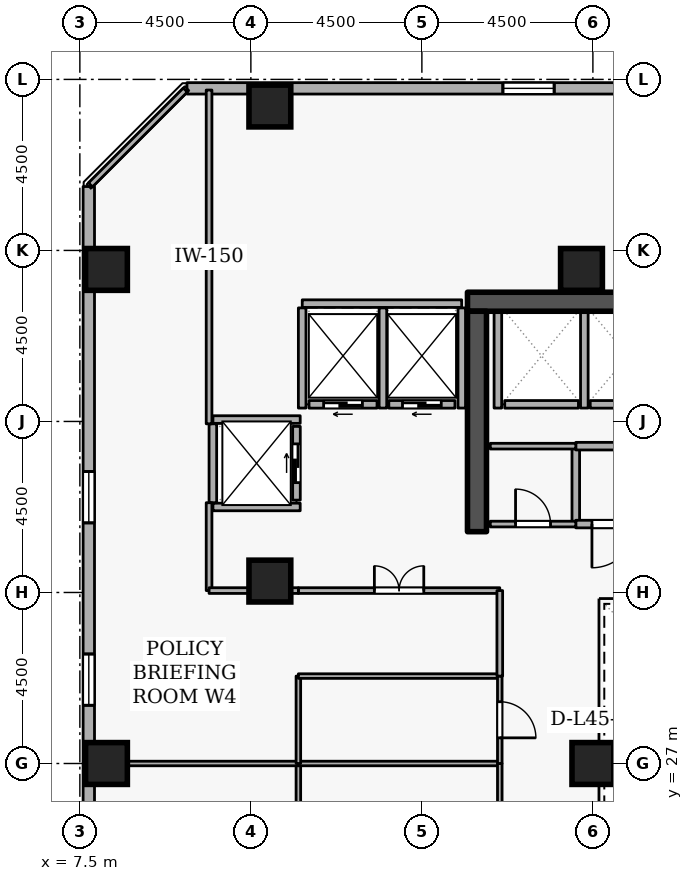
"""IFC4 building model, lengths in metres.
Left out: names, types, materials, properties, quantities, classifications, styles, units other than length and angle.
Written with IfcOpenShell. Run it as: python <this file> out.ifc"""

import sys

from ifc_helpers import new_model, si_unit, direction, frame, frame_2d, origin, origin_2d, place, context, subcontext, project, spatial, rectangle, extrude, element, fill, save


model = new_model("IFC4")
c1 = context("Model", 3, precision=1e-05, world=origin(), true_north=direction((0.0, 1.0)))
c2 = subcontext(c1, "Body", "Model", "MODEL_VIEW")
j1 = project(units=[si_unit("LENGTHUNIT", "METRE"), si_unit("PLANEANGLEUNIT", "RADIAN")], contexts=[c1])
p1 = place(None, origin())
s1 = spatial("IfcSite", under=j1, at=p1, CompositionType="ELEMENT")
p2 = place(p1, origin())
s2 = spatial("IfcBuilding", under=s1, at=p2, CompositionType="ELEMENT")
p3 = place(p2, frame((0.0, 0.0, 170.7)))
s3 = spatial("IfcBuildingStorey", under=s2, at=p3, CompositionType="ELEMENT", Elevation=170.7)
p4 = place(p3, frame((17.7, 39.15, 0.0), z_axis=(0.0, 0.0, 1.0), x_axis=(1.0, 0.0, 0.0)))
e1 = element("IfcWall", 1, at=p4, inside=s3, PredefinedType="SHEAR", context=c2, shape_type="SweptSolid", body=[
    extrude(rectangle(XDim=15.6, YDim=0.5, at=frame_2d((7.8, 0.0))), origin(), (0.0, 0.0, 1.0), 3.6),
])
p5 = place(p3, frame((17.95, 33.1, 0.0), z_axis=(0.0, 0.0, 1.0), x_axis=(0.0, 1.0, 0.0)))
e2 = element("IfcWall", 2, at=p5, inside=s3, PredefinedType="SHEAR", context=c2, shape_type="SweptSolid", body=[
    extrude(rectangle(XDim=5.8, YDim=0.5, at=frame_2d((2.9, 0.0))), origin(), (0.0, 0.0, 1.0), 3.6),
])
for number, where, z_axis, x_axis in (
    (3, (12.5, 44.3, 0.0), (0.0, 0.0, 1.0), (1.0, 0.0, 0.0)),
    (4, (8.2, 27.0, 0.0), (0.0, 0.0, 1.0), (1.0, 0.0, 0.0)),
    (5, (8.2, 40.0, 0.0), (0.0, 0.0, 1.0), (1.0, 0.0, 0.0)),
    (6, (12.5, 31.8, 0.0), (0.0, 0.0, 1.0), (1.0, 0.0, 0.0)),
    (7, (20.7, 40.0, 0.0), (0.0, 0.0, 1.0), (1.0, 0.0, 0.0)),
    (8, (21.0, 27.0, 0.0), (0.0, 0.0, 1.0), (1.0, 0.0, 0.0)),
):
    element("IfcColumn", number, at=place(p3, frame(where, z_axis=z_axis, x_axis=x_axis)), inside=s3, PredefinedType="COLUMN", context=c2, shape_type="SweptSolid", body=[
        extrude(rectangle(XDim=1.1, YDim=1.1, at=origin_2d()), origin(), (0.0, 0.0, 1.0), 3.6),
    ])
p6 = place(p3, frame((46.681, 44.765, 0.0), z_axis=(0.0, 0.0, 1.0), x_axis=(-1.0, 0.0, 0.0)))
e9 = element("IfcWall", 9, at=p6, inside=s3, PredefinedType="STANDARD", context=c2, shape_type="SweptSolid", body=[
    extrude(rectangle(XDim=36.363, YDim=0.3, at=frame_2d((18.181, 0.0))), origin(), (0.0, 0.0, 1.0), 2.22),
])
p7 = place(p6, frame((2.7, 0.0, 0.72)))
e10 = element("IfcOpeningElement", 10, at=p7, cuts=e9, PredefinedType="OPENING", context=c2, shape_type="SweptSolid", body=[
    extrude(rectangle(XDim=1.35, YDim=1.05, at=frame_2d((0.675, 0.525))), frame((0.0, 0.16, 0.0), z_axis=(0.0, -1.0, 0.0), x_axis=(1.0, 0.0, 0.0)), (0.0, 0.0, 1.0), 0.32),
])
p8 = place(p6, frame((12.3, 0.0, 0.72)))
e11 = element("IfcOpeningElement", 11, at=p8, cuts=e9, PredefinedType="OPENING", context=c2, shape_type="SweptSolid", body=[
    extrude(rectangle(XDim=1.35, YDim=1.05, at=frame_2d((0.675, 0.525))), frame((0.0, 0.16, 0.0), z_axis=(0.0, -1.0, 0.0), x_axis=(1.0, 0.0, 0.0)), (0.0, 0.0, 1.0), 0.32),
])
p9 = place(p6, frame((17.1, 0.0, 0.72)))
e12 = element("IfcOpeningElement", 12, at=p9, cuts=e9, PredefinedType="OPENING", context=c2, shape_type="SweptSolid", body=[
    extrude(rectangle(XDim=1.35, YDim=1.05, at=frame_2d((0.675, 0.525))), frame((0.0, 0.16, 0.0), z_axis=(0.0, -1.0, 0.0), x_axis=(1.0, 0.0, 0.0)), (0.0, 0.0, 1.0), 0.32),
])
p10 = place(p6, frame((26.7, 0.0, 0.72)))
e13 = element("IfcOpeningElement", 13, at=p10, cuts=e9, PredefinedType="OPENING", context=c2, shape_type="SweptSolid", body=[
    extrude(rectangle(XDim=1.35, YDim=1.05, at=frame_2d((0.675, 0.525))), frame((0.0, 0.16, 0.0), z_axis=(0.0, -1.0, 0.0), x_axis=(1.0, 0.0, 0.0)), (0.0, 0.0, 1.0), 0.32),
])
p11 = place(p3, frame((7.735, 42.181, 0.0), z_axis=(0.0, 0.0, 1.0), x_axis=(0.0, -1.0, 0.0)))
e14 = element("IfcWall", 14, at=p11, inside=s3, PredefinedType="STANDARD", context=c2, shape_type="SweptSolid", body=[
    extrude(rectangle(XDim=36.363, YDim=0.3, at=frame_2d((18.181, 0.0))), origin(), (0.0, 0.0, 1.0), 2.22),
])
p12 = place(p11, frame((7.5, 0.0, 0.72)))
e15 = element("IfcOpeningElement", 15, at=p12, cuts=e14, PredefinedType="OPENING", context=c2, shape_type="SweptSolid", body=[
    extrude(rectangle(XDim=1.35, YDim=1.05, at=frame_2d((0.675, 0.525))), frame((0.0, 0.16, 0.0), z_axis=(0.0, -1.0, 0.0), x_axis=(1.0, 0.0, 0.0)), (0.0, 0.0, 1.0), 0.32),
])
p13 = place(p11, frame((12.3, 0.0, 0.72)))
e16 = element("IfcOpeningElement", 16, at=p13, cuts=e14, PredefinedType="OPENING", context=c2, shape_type="SweptSolid", body=[
    extrude(rectangle(XDim=1.35, YDim=1.05, at=frame_2d((0.675, 0.525))), frame((0.0, 0.16, 0.0), z_axis=(0.0, -1.0, 0.0), x_axis=(1.0, 0.0, 0.0)), (0.0, 0.0, 1.0), 0.32),
])
p14 = place(p11, frame((17.1, 0.0, 0.72)))
e17 = element("IfcOpeningElement", 17, at=p14, cuts=e14, PredefinedType="OPENING", context=c2, shape_type="SweptSolid", body=[
    extrude(rectangle(XDim=1.35, YDim=1.05, at=frame_2d((0.675, 0.525))), frame((0.0, 0.16, 0.0), z_axis=(0.0, -1.0, 0.0), x_axis=(1.0, 0.0, 0.0)), (0.0, 0.0, 1.0), 0.32),
])
p15 = place(p11, frame((21.9, 0.0, 0.72)))
e18 = element("IfcOpeningElement", 18, at=p15, cuts=e14, PredefinedType="OPENING", context=c2, shape_type="SweptSolid", body=[
    extrude(rectangle(XDim=1.35, YDim=1.05, at=frame_2d((0.675, 0.525))), frame((0.0, 0.16, 0.0), z_axis=(0.0, -1.0, 0.0), x_axis=(1.0, 0.0, 0.0)), (0.0, 0.0, 1.0), 0.32),
])
p16 = place(p11, frame((31.5, 0.0, 0.72)))
e19 = element("IfcOpeningElement", 19, at=p16, cuts=e14, PredefinedType="OPENING", context=c2, shape_type="SweptSolid", body=[
    extrude(rectangle(XDim=1.35, YDim=1.05, at=frame_2d((0.675, 0.525))), frame((0.0, 0.16, 0.0), z_axis=(0.0, -1.0, 0.0), x_axis=(1.0, 0.0, 0.0)), (0.0, 0.0, 1.0), 0.32),
])
p17 = place(p3, frame((22.92, 36.45, 0.0), z_axis=(0.0, 0.0, 1.0), x_axis=(-1.0, 0.0, 0.0)))
e20 = element("IfcWall", 20, at=p17, inside=s3, PredefinedType="STANDARD", context=c2, shape_type="SweptSolid", body=[
    extrude(rectangle(XDim=1.99, YDim=0.2, at=frame_2d((0.995, 0.0))), origin(), (0.0, 0.0, 1.0), 3.26),
])
p18 = place(p3, frame((20.62, 36.45, 0.0), z_axis=(0.0, 0.0, 1.0), x_axis=(-1.0, 0.0, 0.0)))
e21 = element("IfcWall", 21, at=p18, inside=s3, PredefinedType="STANDARD", context=c2, shape_type="SweptSolid", body=[
    extrude(rectangle(XDim=1.94, YDim=0.2, at=frame_2d((0.97, 0.0))), origin(), (0.0, 0.0, 1.0), 3.26),
])
p19 = place(p3, frame((17.37, 36.45, 0.0), z_axis=(0.0, 0.0, 1.0), x_axis=(-1.0, 0.0, 0.0)))
e22 = element("IfcWall", 22, at=p19, inside=s3, PredefinedType="STANDARD", context=c2, shape_type="SweptSolid", body=[
    extrude(rectangle(XDim=1.74, YDim=0.2, at=frame_2d((0.87, 0.0))), origin(), (0.0, 0.0, 1.0), 3.26),
])
p20 = place(p19, frame((0.36, 0.0, 0.0)))
e23 = element("IfcOpeningElement", 23, at=p20, cuts=e22, PredefinedType="OPENING", context=c2, shape_type="SweptSolid", body=[
    extrude(rectangle(XDim=1.02, YDim=2.06, at=frame_2d((0.51, 1.03))), frame((0.0, 0.11, 0.0), z_axis=(0.0, -1.0, 0.0), x_axis=(1.0, 0.0, 0.0)), (0.0, 0.0, 1.0), 0.22),
])
p21 = place(p3, frame((15.32, 36.45, 0.0), z_axis=(0.0, 0.0, 1.0), x_axis=(-1.0, 0.0, 0.0)))
e24 = element("IfcWall", 24, at=p21, inside=s3, PredefinedType="STANDARD", context=c2, shape_type="SweptSolid", body=[
    extrude(rectangle(XDim=1.79, YDim=0.2, at=frame_2d((0.895, 0.0))), origin(), (0.0, 0.0, 1.0), 3.26),
])
p22 = place(p21, frame((0.385, 0.0, 0.0)))
e25 = element("IfcOpeningElement", 25, at=p22, cuts=e24, PredefinedType="OPENING", context=c2, shape_type="SweptSolid", body=[
    extrude(rectangle(XDim=1.02, YDim=2.06, at=frame_2d((0.51, 1.03))), frame((0.0, 0.11, 0.0), z_axis=(0.0, -1.0, 0.0), x_axis=(1.0, 0.0, 0.0)), (0.0, 0.0, 1.0), 0.22),
])
p23 = place(p3, frame((13.2, 33.93, 0.0), z_axis=(0.0, 0.0, 1.0), x_axis=(0.0, 1.0, 0.0)))
e26 = element("IfcWall", 26, at=p23, inside=s3, PredefinedType="STANDARD", context=c2, shape_type="SweptSolid", body=[
    extrude(rectangle(XDim=1.94, YDim=0.2, at=frame_2d((0.97, 0.0))), origin(), (0.0, 0.0, 1.0), 3.26),
])
p24 = place(p23, frame((0.46, 0.0, 0.0)))
e27 = element("IfcOpeningElement", 27, at=p24, cuts=e26, PredefinedType="OPENING", context=c2, shape_type="SweptSolid", body=[
    extrude(rectangle(XDim=1.02, YDim=2.06, at=frame_2d((0.51, 1.03))), frame((0.0, 0.11, 0.0), z_axis=(0.0, -1.0, 0.0), x_axis=(1.0, 0.0, 0.0)), (0.0, 0.0, 1.0), 0.22),
])
for number, where, z_axis, x_axis in (
    (28, (20.775, 36.352, 0.0), (0.0, 0.0, 1.0), (0.0, 1.0, 0.0)),
    (29, (18.5, 36.352, 0.0), (0.0, 0.0, 1.0), (0.0, 1.0, 0.0)),
):
    element("IfcWall", number, at=place(p3, frame(where, z_axis=z_axis, x_axis=x_axis)), inside=s3, PredefinedType="STANDARD", context=c2, shape_type="SweptSolid", body=[
        extrude(rectangle(XDim=2.536, YDim=0.2, at=frame_2d((1.268, 0.0))), origin(), (0.0, 0.0, 1.0), 3.26),
    ])
p25 = place(p3, frame((13.352, 39.1, 0.0), z_axis=(0.0, 0.0, 1.0), x_axis=(1.0, 0.0, 0.0)))
e30 = element("IfcWall", 30, at=p25, inside=s3, PredefinedType="STANDARD", context=c2, shape_type="SweptSolid", body=[
    extrude(rectangle(XDim=4.196, YDim=0.2, at=frame_2d((2.098, 0.0))), origin(), (0.0, 0.0, 1.0), 3.26),
])
p26 = place(p3, frame((17.55, 36.352, 0.0), z_axis=(0.0, 0.0, 1.0), x_axis=(0.0, 1.0, 0.0)))
e31 = element("IfcWall", 31, at=p26, inside=s3, PredefinedType="STANDARD", context=c2, shape_type="SweptSolid", body=[
    extrude(rectangle(XDim=2.636, YDim=0.2, at=frame_2d((1.318, 0.0))), origin(), (0.0, 0.0, 1.0), 2.465),
])
for number, where, z_axis, x_axis in (
    (32, (15.475, 36.352, 0.0), (0.0, 0.0, 1.0), (0.0, 1.0, 0.0)),
    (33, (13.35, 36.352, 0.0), (0.0, 0.0, 1.0), (0.0, 1.0, 0.0)),
):
    element("IfcWall", number, at=place(p3, frame(where, z_axis=z_axis, x_axis=x_axis)), inside=s3, PredefinedType="STANDARD", context=c2, shape_type="SweptSolid", body=[
        extrude(rectangle(XDim=2.636, YDim=0.2, at=frame_2d((1.318, 0.0))), origin(), (0.0, 0.0, 1.0), 3.26),
    ])
for number, where, z_axis, x_axis in (
    (34, (11.002, 36.05, 0.0), (0.0, 0.0, 1.0), (1.0, 0.0, 0.0)),
    (35, (11.002, 33.75, 0.0), (0.0, 0.0, 1.0), (1.0, 0.0, 0.0)),
):
    element("IfcWall", number, at=place(p3, frame(where, z_axis=z_axis, x_axis=x_axis)), inside=s3, PredefinedType="STANDARD", context=c2, shape_type="SweptSolid", body=[
        extrude(rectangle(XDim=2.296, YDim=0.2, at=frame_2d((1.148, 0.0))), origin(), (0.0, 0.0, 1.0), 3.26),
    ])
p27 = place(p3, frame((11.0, 33.862, 0.0), z_axis=(0.0, 0.0, 1.0), x_axis=(0.0, 1.0, 0.0)))
e36 = element("IfcWall", 36, at=p27, inside=s3, PredefinedType="STANDARD", context=c2, shape_type="SweptSolid", body=[
    extrude(rectangle(XDim=2.076, YDim=0.2, at=frame_2d((1.038, 0.0))), origin(), (0.0, 0.0, 1.0), 3.26),
])
p28 = place(p3, frame((20.55, 33.3, 0.0), z_axis=(0.0, 0.0, 1.0), x_axis=(0.0, 1.0, 0.0)))
e37 = element("IfcWall", 37, at=p28, inside=s3, PredefinedType="STANDARD", context=c2, shape_type="SweptSolid", body=[
    extrude(rectangle(XDim=2.05, YDim=0.2, at=frame_2d((1.025, 0.0))), origin(), (0.0, 0.0, 1.0), 3.26),
])
p29 = place(p3, frame((20.55, 35.35, 0.0), z_axis=(0.0, 0.0, 1.0), x_axis=(1.0, 0.0, 0.0)))
e38 = element("IfcWall", 38, at=p29, inside=s3, PredefinedType="STANDARD", context=c2, shape_type="SweptSolid", body=[
    extrude(rectangle(XDim=2.0, YDim=0.2, at=frame_2d((1.0, 0.0))), origin(), (0.0, 0.0, 1.0), 3.26),
])
p30 = place(p3, frame((22.55, 33.3, 0.0), z_axis=(0.0, 0.0, 1.0), x_axis=(-1.0, 0.0, 0.0)))
e39 = element("IfcWall", 39, at=p30, inside=s3, PredefinedType="STANDARD", context=c2, shape_type="SweptSolid", body=[
    extrude(rectangle(XDim=2.0, YDim=0.2, at=frame_2d((1.0, 0.0))), origin(), (0.0, 0.0, 1.0), 3.26),
])
p31 = place(p30, frame((0.425, 0.0, 0.0)))
e40 = element("IfcOpeningElement", 40, at=p31, cuts=e39, PredefinedType="OPENING", context=c2, shape_type="SweptSolid", body=[
    extrude(rectangle(XDim=1.15, YDim=2.1, at=frame_2d((0.575, 1.05))), frame((0.0, 0.11, 0.0), z_axis=(0.0, -1.0, 0.0), x_axis=(1.0, 0.0, 0.0)), (0.0, 0.0, 1.0), 0.22),
])
p32 = place(p3, frame((18.3, 33.3, 0.0), z_axis=(0.0, 0.0, 1.0), x_axis=(1.0, 0.0, 0.0)))
e41 = element("IfcWall", 41, at=p32, inside=s3, PredefinedType="PARTITIONING", context=c2, shape_type="SweptSolid", body=[
    extrude(rectangle(XDim=2.25, YDim=0.15, at=frame_2d((1.125, 0.0))), origin(), (0.0, 0.0, 1.0), 3.26),
])
p33 = place(p32, frame((0.665, 0.0, 0.0)))
e42 = element("IfcOpeningElement", 42, at=p33, cuts=e41, PredefinedType="OPENING", context=c2, shape_type="SweptSolid", body=[
    extrude(rectangle(XDim=0.92, YDim=2.08, at=frame_2d((0.46, 1.04))), frame((0.0, 0.085, 0.0), z_axis=(0.0, -1.0, 0.0), x_axis=(1.0, 0.0, 0.0)), (0.0, 0.0, 1.0), 0.17),
])
p34 = place(p3, frame((20.55, 35.35, 0.0), z_axis=(0.0, 0.0, 1.0), x_axis=(-1.0, 0.0, 0.0)))
e43 = element("IfcWall", 43, at=p34, inside=s3, PredefinedType="PARTITIONING", context=c2, shape_type="SweptSolid", body=[
    extrude(rectangle(XDim=2.25, YDim=0.15, at=frame_2d((1.125, 0.0))), origin(), (0.0, 0.0, 1.0), 3.26),
])
p35 = place(p3, frame((13.25, 27.0, 0.0), z_axis=(0.0, 0.0, 1.0), x_axis=(0.0, -1.0, 0.0)))
e44 = element("IfcWall", 44, at=p35, inside=s3, PredefinedType="PARTITIONING", context=c2, shape_type="SweptSolid", body=[
    extrude(rectangle(XDim=4.55, YDim=0.12, at=frame_2d((2.275, 0.0))), origin(), (0.0, 0.0, 1.0), 3.26),
])
p36 = place(p3, frame((7.78, 27.0, 0.0), z_axis=(0.0, 0.0, 1.0), x_axis=(1.0, 0.0, 0.0)))
e45 = element("IfcWall", 45, at=p36, inside=s3, PredefinedType="PARTITIONING", context=c2, shape_type="SweptSolid", body=[
    extrude(rectangle(XDim=5.47, YDim=0.12, at=frame_2d((2.735, 0.0))), origin(), (0.0, 0.0, 1.0), 2.802),
])
p37 = place(p3, frame((13.25, 27.0, 0.0), z_axis=(0.0, 0.0, 1.0), x_axis=(1.0, 0.0, 0.0)))
e46 = element("IfcWall", 46, at=p37, inside=s3, PredefinedType="PARTITIONING", context=c2, shape_type="SweptSolid", body=[
    extrude(rectangle(XDim=5.3, YDim=0.12, at=frame_2d((2.65, 0.0))), origin(), (0.0, 0.0, 1.0), 2.802),
])
p38 = place(p3, frame((18.55, 27.0, 0.0), z_axis=(0.0, 0.0, 1.0), x_axis=(0.0, -1.0, 0.0)))
e47 = element("IfcWall", 47, at=p38, inside=s3, PredefinedType="PARTITIONING", context=c2, shape_type="SweptSolid", body=[
    extrude(rectangle(XDim=4.55, YDim=0.12, at=frame_2d((2.275, 0.0))), origin(), (0.0, 0.0, 1.0), 3.26),
])
p39 = place(p3, frame((13.25, 27.0, 0.0), z_axis=(0.0, 0.0, 1.0), x_axis=(0.0, 1.0, 0.0)))
e48 = element("IfcWall", 48, at=p39, inside=s3, PredefinedType="PARTITIONING", context=c2, shape_type="SweptSolid", body=[
    extrude(rectangle(XDim=2.3, YDim=0.12, at=frame_2d((1.15, 0.0))), origin(), (0.0, 0.0, 1.0), 3.26),
])
p40 = place(p3, frame((13.25, 29.3, 0.0), z_axis=(0.0, 0.0, 1.0), x_axis=(1.0, 0.0, 0.0)))
e49 = element("IfcWall", 49, at=p40, inside=s3, PredefinedType="PARTITIONING", context=c2, shape_type="SweptSolid", body=[
    extrude(rectangle(XDim=5.3, YDim=0.12, at=frame_2d((2.65, 0.0))), origin(), (0.0, 0.0, 1.0), 3.26),
])
p41 = place(p3, frame((18.55, 29.3, 0.0), z_axis=(0.0, 0.0, 1.0), x_axis=(0.0, -1.0, 0.0)))
e50 = element("IfcWall", 50, at=p41, inside=s3, PredefinedType="PARTITIONING", context=c2, shape_type="SweptSolid", body=[
    extrude(rectangle(XDim=2.3, YDim=0.12, at=frame_2d((1.15, 0.0))), origin(), (0.0, 0.0, 1.0), 3.26),
])
p42 = place(p41, frame((0.675, 0.0, 0.0)))
e51 = element("IfcOpeningElement", 51, at=p42, cuts=e50, PredefinedType="OPENING", context=c2, shape_type="SweptSolid", body=[
    extrude(rectangle(XDim=0.95, YDim=2.1, at=frame_2d((0.475, 1.05))), frame((0.0, 0.07, 0.0), z_axis=(0.0, -1.0, 0.0), x_axis=(1.0, 0.0, 0.0)), (0.0, 0.0, 1.0), 0.14),
])
p43 = place(p3, frame((13.25, 31.55, 0.0), z_axis=(0.0, 0.0, 1.0), x_axis=(1.0, 0.0, 0.0)))
e52 = element("IfcWall", 52, at=p43, inside=s3, PredefinedType="PARTITIONING", context=c2, shape_type="SweptSolid", body=[
    extrude(rectangle(XDim=5.3, YDim=0.15, at=frame_2d((2.65, 0.0))), origin(), (0.0, 0.0, 1.0), 3.26),
])
p44 = place(p43, frame((2.0, 0.0, 0.0)))
e53 = element("IfcOpeningElement", 53, at=p44, cuts=e52, PredefinedType="OPENING", context=c2, shape_type="SweptSolid", body=[
    extrude(rectangle(XDim=1.3, YDim=2.12, at=frame_2d((0.65, 1.06))), frame((0.0, 0.085, 0.0), z_axis=(0.0, -1.0, 0.0), x_axis=(1.0, 0.0, 0.0)), (0.0, 0.0, 1.0), 0.17),
])
p45 = place(p3, frame((18.55, 31.55, 0.0), z_axis=(0.0, 0.0, 1.0), x_axis=(0.0, -1.0, 0.0)))
e54 = element("IfcWall", 54, at=p45, inside=s3, PredefinedType="PARTITIONING", context=c2, shape_type="SweptSolid", body=[
    extrude(rectangle(XDim=2.25, YDim=0.15, at=frame_2d((1.125, 0.0))), origin(), (0.0, 0.0, 1.0), 3.26),
])
p46 = place(p3, frame((7.78, 42.225, 0.0), z_axis=(0.0, 0.0, 1.0), x_axis=(0.707106781187, 0.707106781187, 0.0)))
e55 = element("IfcWall", 55, at=p46, inside=s3, PredefinedType="PARTITIONING", context=c2, shape_type="SweptSolid", body=[
    extrude(rectangle(XDim=3.528, YDim=0.15, at=frame_2d((1.764, 0.0))), origin(), (0.0, 0.0, 1.0), 3.26),
])
p47 = place(p3, frame((10.9, 44.72, 0.0), z_axis=(0.0, 0.0, 1.0), x_axis=(0.0, -1.0, 0.0)))
e56 = element("IfcWall", 56, at=p47, inside=s3, PredefinedType="PARTITIONING", context=c2, shape_type="SweptSolid", body=[
    extrude(rectangle(XDim=8.782, YDim=0.15, at=frame_2d((4.391, 0.0))), origin(), (0.0, 0.0, 1.0), 3.26),
])
p48 = place(p3, frame((10.9, 33.862, 0.0), z_axis=(0.0, 0.0, 1.0), x_axis=(0.0, -1.0, 0.0)))
e57 = element("IfcWall", 57, at=p48, inside=s3, PredefinedType="PARTITIONING", context=c2, shape_type="SweptSolid", body=[
    extrude(rectangle(XDim=2.312, YDim=0.15, at=frame_2d((1.156, 0.0))), origin(), (0.0, 0.0, 1.0), 3.26),
])
p49 = place(p3, frame((10.9, 31.55, 0.0), z_axis=(0.0, 0.0, 1.0), x_axis=(1.0, 0.0, 0.0)))
e58 = element("IfcWall", 58, at=p49, inside=s3, PredefinedType="PARTITIONING", context=c2, shape_type="SweptSolid", body=[
    extrude(rectangle(XDim=2.35, YDim=0.15, at=frame_2d((1.175, 0.0))), origin(), (0.0, 0.0, 1.0), 3.26),
])
p50 = place(p10, origin())
e59 = element("IfcWindow", 59, at=p50, inside=s3, PartitioningType="SINGLE_PANEL", PredefinedType="WINDOW", context=c2, shape_type="SweptSolid", body=[
    extrude(rectangle(XDim=1.35, YDim=1.05, at=frame_2d((0.675, 0.525))), frame((0.0, 0.03, 0.0), z_axis=(0.0, -1.0, 0.0), x_axis=(1.0, 0.0, 0.0)), (0.0, 0.0, 1.0), 0.06),
])
fill(e13, e59)
p51 = place(p12, origin())
e60 = element("IfcWindow", 60, at=p51, inside=s3, PartitioningType="SINGLE_PANEL", PredefinedType="WINDOW", context=c2, shape_type="SweptSolid", body=[
    extrude(rectangle(XDim=1.35, YDim=1.05, at=frame_2d((0.675, 0.525))), frame((0.0, 0.03, 0.0), z_axis=(0.0, -1.0, 0.0), x_axis=(1.0, 0.0, 0.0)), (0.0, 0.0, 1.0), 0.06),
])
fill(e15, e60)
p52 = place(p13, origin())
e61 = element("IfcWindow", 61, at=p52, inside=s3, PartitioningType="SINGLE_PANEL", PredefinedType="WINDOW", context=c2, shape_type="SweptSolid", body=[
    extrude(rectangle(XDim=1.35, YDim=1.05, at=frame_2d((0.675, 0.525))), frame((0.0, 0.03, 0.0), z_axis=(0.0, -1.0, 0.0), x_axis=(1.0, 0.0, 0.0)), (0.0, 0.0, 1.0), 0.06),
])
fill(e16, e61)
p53 = place(p20, origin())
e62 = element("IfcDoor", 62, at=p53, inside=s3, OperationType="SLIDING_TO_LEFT", PredefinedType="DOOR", context=c2, shape_type="SweptSolid", body=[
    extrude(rectangle(XDim=1.02, YDim=2.06, at=frame_2d((0.51, 1.03))), frame((0.0, 0.025, 0.0), z_axis=(0.0, -1.0, 0.0), x_axis=(1.0, 0.0, 0.0)), (0.0, 0.0, 1.0), 0.05),
])
fill(e23, e62)
p54 = place(p22, origin())
e63 = element("IfcDoor", 63, at=p54, inside=s3, OperationType="SLIDING_TO_LEFT", PredefinedType="DOOR", context=c2, shape_type="SweptSolid", body=[
    extrude(rectangle(XDim=1.02, YDim=2.06, at=frame_2d((0.51, 1.03))), frame((0.0, 0.025, 0.0), z_axis=(0.0, -1.0, 0.0), x_axis=(1.0, 0.0, 0.0)), (0.0, 0.0, 1.0), 0.05),
])
fill(e25, e63)
p55 = place(p24, origin())
e64 = element("IfcDoor", 64, at=p55, inside=s3, OperationType="SLIDING_TO_LEFT", PredefinedType="DOOR", context=c2, shape_type="SweptSolid", body=[
    extrude(rectangle(XDim=1.02, YDim=2.06, at=frame_2d((0.51, 1.03))), frame((0.0, 0.025, 0.0), z_axis=(0.0, -1.0, 0.0), x_axis=(1.0, 0.0, 0.0)), (0.0, 0.0, 1.0), 0.05),
])
fill(e27, e64)
p56 = place(p33, origin())
e65 = element("IfcDoor", 65, at=p56, inside=s3, OperationType="SINGLE_SWING_LEFT", PredefinedType="DOOR", context=c2, shape_type="SweptSolid", body=[
    extrude(rectangle(XDim=0.92, YDim=2.08, at=frame_2d((0.46, 1.04))), frame((0.0, 0.025, 0.0), z_axis=(0.0, -1.0, 0.0), x_axis=(1.0, 0.0, 0.0)), (0.0, 0.0, 1.0), 0.05),
])
fill(e42, e65)
p57 = place(p31, origin())
e66 = element("IfcDoor", 66, at=p57, inside=s3, OperationType="SINGLE_SWING_RIGHT", PredefinedType="DOOR", context=c2, shape_type="SweptSolid", body=[
    extrude(rectangle(XDim=1.15, YDim=2.1, at=frame_2d((0.575, 1.05))), frame((0.0, 0.025, 0.0), z_axis=(0.0, -1.0, 0.0), x_axis=(1.0, 0.0, 0.0)), (0.0, 0.0, 1.0), 0.05),
])
fill(e40, e66)
p58 = place(p42, origin())
e67 = element("IfcDoor", 67, at=p58, inside=s3, OperationType="SINGLE_SWING_RIGHT", PredefinedType="DOOR", context=c2, shape_type="SweptSolid", body=[
    extrude(rectangle(XDim=0.95, YDim=2.1, at=frame_2d((0.475, 1.05))), frame((0.0, 0.025, 0.0), z_axis=(0.0, -1.0, 0.0), x_axis=(1.0, 0.0, 0.0)), (0.0, 0.0, 1.0), 0.05),
])
fill(e51, e67)
p59 = place(p44, origin())
e68 = element("IfcDoor", 68, at=p59, inside=s3, OperationType="DOUBLE_DOOR_SINGLE_SWING", PredefinedType="DOOR", context=c2, shape_type="SweptSolid", body=[
    extrude(rectangle(XDim=1.3, YDim=2.12, at=frame_2d((0.65, 1.06))), frame((0.0, 0.025, 0.0), z_axis=(0.0, -1.0, 0.0), x_axis=(1.0, 0.0, 0.0)), (0.0, 0.0, 1.0), 0.05),
])
fill(e53, e68)
save(model, sys.argv[1])
